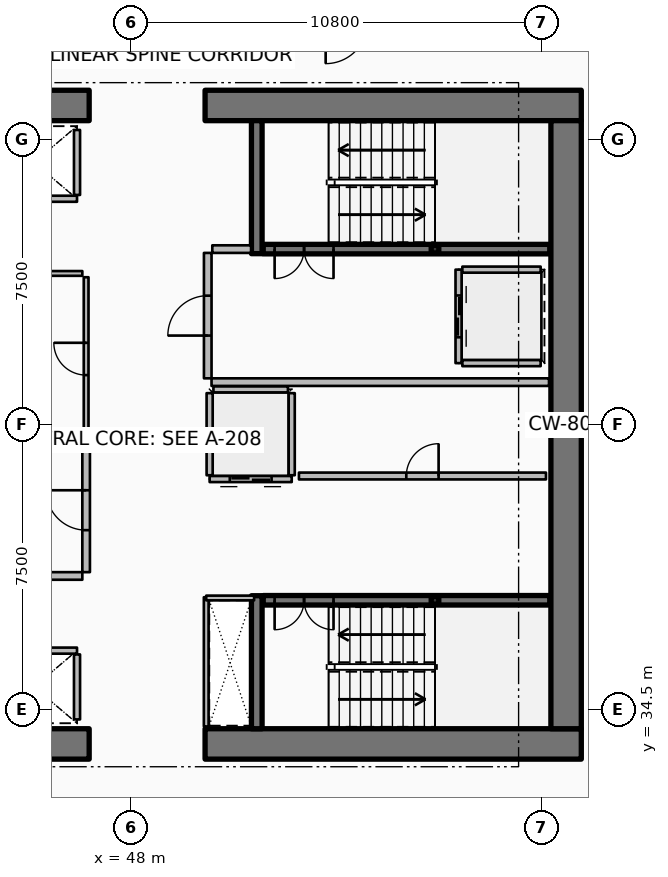
"""IFC4 building model, lengths in metres.
Left out: names, types, materials, properties, quantities, classifications, styles, units other than length and angle.
Written with IfcOpenShell. Run it as: python <this file> out.ifc"""

import sys

from ifc_helpers import new_model, si_unit, direction, frame, frame_2d, origin, origin_2d, place, context, subcontext, project, spatial, rectangle, hollow_rectangle, extrude, element, fill, save


model = new_model("IFC4")
c1 = context("Model", 3, precision=1e-05, world=origin(), true_north=direction((0.0, 1.0)))
c2 = subcontext(c1, "Body", "Model", "MODEL_VIEW")
j1 = project(units=[si_unit("LENGTHUNIT", "METRE"), si_unit("PLANEANGLEUNIT", "RADIAN")], contexts=[c1])
p1 = place(None, origin())
s1 = spatial("IfcSite", under=j1, at=p1, CompositionType="ELEMENT")
p2 = place(p1, origin())
s2 = spatial("IfcBuilding", under=s1, at=p2, CompositionType="ELEMENT")
p3 = place(p2, frame((0.0, 0.0, 172.8)))
s3 = spatial("IfcBuildingStorey", under=s2, at=p3, CompositionType="ELEMENT", Elevation=172.8)
p4 = place(p3, frame((37.0, 33.6, 0.0), z_axis=(0.0, 0.0, 1.0), x_axis=(1.0, 0.0, 0.0)))
e1 = element("IfcWall", 1, at=p4, inside=s3, PredefinedType="SHEAR", context=c2, shape_type="SweptSolid", body=[
    extrude(rectangle(XDim=9.9, YDim=0.8, at=frame_2d((4.95, 0.0))), origin(), (0.0, 0.0, 1.0), 3.75),
])
p5 = place(p3, frame((49.95, 33.6, 0.0), z_axis=(0.0, 0.0, 1.0), x_axis=(1.0, 0.0, 0.0)))
e2 = element("IfcWall", 2, at=p5, inside=s3, PredefinedType="SHEAR", context=c2, shape_type="SweptSolid", body=[
    extrude(rectangle(XDim=9.9, YDim=0.8, at=frame_2d((4.95, 0.0))), origin(), (0.0, 0.0, 1.0), 3.75),
])
p6 = place(p3, frame((37.0, 50.4, 0.0), z_axis=(0.0, 0.0, 1.0), x_axis=(1.0, 0.0, 0.0)))
e3 = element("IfcWall", 3, at=p6, inside=s3, PredefinedType="SHEAR", context=c2, shape_type="SweptSolid", body=[
    extrude(rectangle(XDim=9.9, YDim=0.8, at=frame_2d((4.95, 0.0))), origin(), (0.0, 0.0, 1.0), 3.75),
])
p7 = place(p3, frame((49.95, 50.4, 0.0), z_axis=(0.0, 0.0, 1.0), x_axis=(1.0, 0.0, 0.0)))
e4 = element("IfcWall", 4, at=p7, inside=s3, PredefinedType="SHEAR", context=c2, shape_type="SweptSolid", body=[
    extrude(rectangle(XDim=9.9, YDim=0.8, at=frame_2d((4.95, 0.0))), origin(), (0.0, 0.0, 1.0), 3.75),
])
p8 = place(p3, frame((59.45, 34.0, 0.0), z_axis=(0.0, 0.0, 1.0), x_axis=(0.0, 1.0, 0.0)))
e5 = element("IfcWall", 5, at=p8, inside=s3, PredefinedType="SHEAR", context=c2, shape_type="SweptSolid", body=[
    extrude(rectangle(XDim=16.0, YDim=0.8, at=frame_2d((8.0, 0.0))), origin(), (0.0, 0.0, 1.0), 3.75),
])
for number, where, z_axis, x_axis in (
    (6, (51.31, 46.5, 0.0), (0.0, 0.0, 1.0), (0.0, 1.0, 0.0)),
    (7, (51.31, 34.0, 0.0), (0.0, 0.0, 1.0), (0.0, 1.0, 0.0)),
):
    element("IfcWall", number, at=place(p3, frame(where, z_axis=z_axis, x_axis=x_axis)), inside=s3, PredefinedType="SHEAR", context=c2, shape_type="SweptSolid", body=[
        extrude(rectangle(XDim=3.5, YDim=0.28, at=frame_2d((1.75, 0.0))), origin(), (0.0, 0.0, 1.0), 3.75),
    ])
for number, where, z_axis, x_axis in (
    (8, (56.0, 46.62, 0.0), (0.0, 0.0, 1.0), (1.0, 0.0, 0.0)),
    (9, (56.0, 37.38, 0.0), (0.0, 0.0, 1.0), (1.0, 0.0, 0.0)),
):
    element("IfcColumn", number, at=place(p3, frame(where, z_axis=z_axis, x_axis=x_axis)), inside=s3, PredefinedType="COLUMN", context=c2, shape_type="SweptSolid", body=[
        extrude(hollow_rectangle(XDim=0.2, YDim=0.2, WallThickness=0.01, InnerFilletRadius=0.01, OuterFilletRadius=0.02, at=origin_2d()), origin(), (0.0, 0.0, 1.0), 1.67),
    ])
p9 = place(p3, frame((51.48, 46.62, 0.0), z_axis=(0.0, 0.0, 1.0), x_axis=(1.0, 0.0, 0.0)))
e10 = element("IfcWall", 10, at=p9, inside=s3, PredefinedType="SOLIDWALL", context=c2, shape_type="SweptSolid", body=[
    extrude(rectangle(XDim=7.54, YDim=0.25, at=frame_2d((3.77, 0.0))), origin(), (0.0, 0.0, 1.0), 3.35),
])
p10 = place(p9, frame((0.3, 0.0, 0.0)))
e11 = element("IfcOpeningElement", 11, at=p10, cuts=e10, PredefinedType="OPENING", context=c2, shape_type="SweptSolid", body=[
    extrude(rectangle(XDim=1.55, YDim=2.15, at=frame_2d((0.775, 1.075))), frame((0.0, 0.135, 0.0), z_axis=(0.0, -1.0, 0.0), x_axis=(1.0, 0.0, 0.0)), (0.0, 0.0, 1.0), 0.27),
])
p11 = place(p3, frame((51.48, 37.38, 0.0), z_axis=(0.0, 0.0, 1.0), x_axis=(1.0, 0.0, 0.0)))
e12 = element("IfcWall", 12, at=p11, inside=s3, PredefinedType="SOLIDWALL", context=c2, shape_type="SweptSolid", body=[
    extrude(rectangle(XDim=7.54, YDim=0.25, at=frame_2d((3.77, 0.0))), origin(), (0.0, 0.0, 1.0), 3.35),
])
p12 = place(p11, frame((0.3, 0.0, 0.0)))
e13 = element("IfcOpeningElement", 13, at=p12, cuts=e12, PredefinedType="OPENING", context=c2, shape_type="SweptSolid", body=[
    extrude(rectangle(XDim=1.55, YDim=2.15, at=frame_2d((0.775, 1.075))), frame((0.0, 0.135, 0.0), z_axis=(0.0, -1.0, 0.0), x_axis=(1.0, 0.0, 0.0)), (0.0, 0.0, 1.0), 0.27),
])
p13 = place(p3, frame((46.58, 47.945, 0.0), z_axis=(0.0, 0.0, 1.0), x_axis=(-1.0, 0.0, 0.0)))
e14 = element("IfcWall", 14, at=p13, inside=s3, PredefinedType="PARTITIONING", context=c2, shape_type="SweptSolid", body=[
    extrude(rectangle(XDim=2.26, YDim=0.16, at=frame_2d((1.13, 0.0))), origin(), (0.0, 0.0, 1.0), 3.35),
])
p14 = place(p3, frame((46.58, 48.045, 0.0), z_axis=(0.0, 0.0, 1.0), x_axis=(0.0, 1.0, 0.0)))
e15 = element("IfcWall", 15, at=p14, inside=s3, PredefinedType="PARTITIONING", context=c2, shape_type="SweptSolid", body=[
    extrude(rectangle(XDim=1.71, YDim=0.16, at=frame_2d((0.855, 0.0))), origin(), (0.0, 0.0, 1.0), 3.35),
])
p15 = place(p3, frame((44.32, 36.055, 0.0), z_axis=(0.0, 0.0, 1.0), x_axis=(1.0, 0.0, 0.0)))
e16 = element("IfcWall", 16, at=p15, inside=s3, PredefinedType="PARTITIONING", context=c2, shape_type="SweptSolid", body=[
    extrude(rectangle(XDim=2.26, YDim=0.16, at=frame_2d((1.13, 0.0))), origin(), (0.0, 0.0, 1.0), 3.35),
])
p16 = place(p3, frame((46.58, 34.245, 0.0), z_axis=(0.0, 0.0, 1.0), x_axis=(0.0, 1.0, 0.0)))
e17 = element("IfcWall", 17, at=p16, inside=s3, PredefinedType="PARTITIONING", context=c2, shape_type="SweptSolid", body=[
    extrude(rectangle(XDim=1.71, YDim=0.16, at=frame_2d((0.855, 0.0))), origin(), (0.0, 0.0, 1.0), 3.35),
])
p17 = place(p3, frame((56.62, 46.08, 0.0), z_axis=(0.0, 0.0, 1.0), x_axis=(0.0, -1.0, 0.0)))
e18 = element("IfcWall", 18, at=p17, inside=s3, PredefinedType="PARTITIONING", context=c2, shape_type="SweptSolid", body=[
    extrude(rectangle(XDim=2.46, YDim=0.16, at=frame_2d((1.23, 0.0))), origin(), (0.0, 0.0, 1.0), 3.35),
])
p18 = place(p17, frame((0.68, 0.0, 0.0)))
e19 = element("IfcOpeningElement", 19, at=p18, cuts=e18, PredefinedType="OPENING", context=c2, shape_type="SweptSolid", body=[
    extrude(rectangle(XDim=1.1, YDim=2.1, at=frame_2d((0.55, 1.05))), frame((0.0, 0.09, 0.0), z_axis=(0.0, -1.0, 0.0), x_axis=(1.0, 0.0, 0.0)), (0.0, 0.0, 1.0), 0.18),
])
for number, where, z_axis, x_axis in (
    (20, (56.72, 46.08, 0.0), (0.0, 0.0, 1.0), (1.0, 0.0, 0.0)),
    (21, (56.72, 43.62, 0.0), (0.0, 0.0, 1.0), (1.0, 0.0, 0.0)),
):
    element("IfcWall", number, at=place(p3, frame(where, z_axis=z_axis, x_axis=x_axis)), inside=s3, PredefinedType="PARTITIONING", context=c2, shape_type="SweptSolid", body=[
        extrude(rectangle(XDim=2.06, YDim=0.16, at=frame_2d((1.03, 0.0))), origin(), (0.0, 0.0, 1.0), 3.35),
    ])
p19 = place(p3, frame((52.23, 40.57, 0.0), z_axis=(0.0, 0.0, 1.0), x_axis=(-1.0, 0.0, 0.0)))
e22 = element("IfcWall", 22, at=p19, inside=s3, PredefinedType="PARTITIONING", context=c2, shape_type="SweptSolid", body=[
    extrude(rectangle(XDim=2.16, YDim=0.16, at=frame_2d((1.08, 0.0))), origin(), (0.0, 0.0, 1.0), 3.35),
])
p20 = place(p19, frame((0.53, 0.0, 0.0)))
e23 = element("IfcOpeningElement", 23, at=p20, cuts=e22, PredefinedType="OPENING", context=c2, shape_type="SweptSolid", body=[
    extrude(rectangle(XDim=1.1, YDim=2.1, at=frame_2d((0.55, 1.05))), frame((0.0, 0.09, 0.0), z_axis=(0.0, -1.0, 0.0), x_axis=(1.0, 0.0, 0.0)), (0.0, 0.0, 1.0), 0.18),
])
for number, where, z_axis, x_axis in (
    (24, (52.23, 40.67, 0.0), (0.0, 0.0, 1.0), (0.0, 1.0, 0.0)),
    (25, (50.07, 40.67, 0.0), (0.0, 0.0, 1.0), (0.0, 1.0, 0.0)),
):
    element("IfcWall", number, at=place(p3, frame(where, z_axis=z_axis, x_axis=x_axis)), inside=s3, PredefinedType="PARTITIONING", context=c2, shape_type="SweptSolid", body=[
        extrude(rectangle(XDim=2.16, YDim=0.16, at=frame_2d((1.08, 0.0))), origin(), (0.0, 0.0, 1.0), 3.35),
    ])
p21 = place(p3, frame((50.17, 42.93, 0.0), z_axis=(0.0, 0.0, 1.0), x_axis=(1.0, 0.0, 0.0)))
e26 = element("IfcWall", 26, at=p21, inside=s3, PredefinedType="PARTITIONING", context=c2, shape_type="SweptSolid", body=[
    extrude(rectangle(XDim=1.96, YDim=0.16, at=frame_2d((0.98, 0.0))), origin(), (0.0, 0.0, 1.0), 3.35),
])
p22 = place(p3, frame((52.42, 40.65, 0.0), z_axis=(0.0, 0.0, 1.0), x_axis=(1.0, 0.0, 0.0)))
e27 = element("IfcWall", 27, at=p22, inside=s3, PredefinedType="PARTITIONING", context=c2, shape_type="SweptSolid", body=[
    extrude(rectangle(XDim=6.5, YDim=0.18, at=frame_2d((3.25, 0.0))), origin(), (0.0, 0.0, 1.0), 3.35),
])
p23 = place(p22, frame((2.825, 0.0, 0.0)))
e28 = element("IfcOpeningElement", 28, at=p23, cuts=e27, PredefinedType="OPENING", context=c2, shape_type="SweptSolid", body=[
    extrude(rectangle(XDim=0.85, YDim=2.06, at=frame_2d((0.425, 1.03))), frame((0.0, 0.1, 0.0), z_axis=(0.0, -1.0, 0.0), x_axis=(1.0, 0.0, 0.0)), (0.0, 0.0, 1.0), 0.2),
])
p24 = place(p3, frame((41.35, 38.02, 0.0), z_axis=(0.0, 0.0, 1.0), x_axis=(1.0, 0.0, 0.0)))
e29 = element("IfcWall", 29, at=p24, inside=s3, PredefinedType="PARTITIONING", context=c2, shape_type="SweptSolid", body=[
    extrude(rectangle(XDim=5.37, YDim=0.2, at=frame_2d((2.685, 0.0))), origin(), (0.0, 0.0, 1.0), 3.35),
])
p25 = place(p3, frame((43.92, 41.48, 0.0), z_axis=(0.0, 0.0, 1.0), x_axis=(1.0, 0.0, 0.0)))
e30 = element("IfcWall", 30, at=p25, inside=s3, PredefinedType="PARTITIONING", context=c2, shape_type="SweptSolid", body=[
    extrude(rectangle(XDim=2.8, YDim=0.2, at=frame_2d((1.4, 0.0))), origin(), (0.0, 0.0, 1.0), 3.35),
])
p26 = place(p3, frame((46.82, 38.12, 0.0), z_axis=(0.0, 0.0, 1.0), x_axis=(0.0, 1.0, 0.0)))
e31 = element("IfcWall", 31, at=p26, inside=s3, PredefinedType="PARTITIONING", context=c2, shape_type="SweptSolid", body=[
    extrude(rectangle(XDim=3.26, YDim=0.2, at=frame_2d((1.63, 0.0))), origin(), (0.0, 0.0, 1.0), 3.35),
])
p27 = place(p26, frame((1.105, 0.0, 0.0)))
e32 = element("IfcOpeningElement", 32, at=p27, cuts=e31, PredefinedType="OPENING", context=c2, shape_type="SweptSolid", body=[
    extrude(rectangle(XDim=1.05, YDim=2.1, at=frame_2d((0.525, 1.05))), frame((0.0, 0.11, 0.0), z_axis=(0.0, -1.0, 0.0), x_axis=(1.0, 0.0, 0.0)), (0.0, 0.0, 1.0), 0.22),
])
p28 = place(p3, frame((50.12, 43.12, 0.0), z_axis=(0.0, 0.0, 1.0), x_axis=(1.0, 0.0, 0.0)))
e33 = element("IfcWall", 33, at=p28, inside=s3, PredefinedType="PARTITIONING", context=c2, shape_type="SweptSolid", body=[
    extrude(rectangle(XDim=8.88, YDim=0.2, at=frame_2d((4.44, 0.0))), origin(), (0.0, 0.0, 1.0), 3.35),
])
p29 = place(p3, frame((50.14, 46.62, 0.0), z_axis=(0.0, 0.0, 1.0), x_axis=(1.0, 0.0, 0.0)))
e34 = element("IfcWall", 34, at=p29, inside=s3, PredefinedType="PARTITIONING", context=c2, shape_type="SweptSolid", body=[
    extrude(rectangle(XDim=1.02, YDim=0.2, at=frame_2d((0.51, 0.0))), origin(), (0.0, 0.0, 1.0), 3.35),
])
p30 = place(p3, frame((50.02, 43.22, 0.0), z_axis=(0.0, 0.0, 1.0), x_axis=(0.0, 1.0, 0.0)))
e35 = element("IfcWall", 35, at=p30, inside=s3, PredefinedType="PARTITIONING", context=c2, shape_type="SweptSolid", body=[
    extrude(rectangle(XDim=3.3, YDim=0.2, at=frame_2d((1.65, 0.0))), origin(), (0.0, 0.0, 1.0), 3.35),
])
p31 = place(p30, frame((1.125, 0.0, 0.0)))
e36 = element("IfcOpeningElement", 36, at=p31, cuts=e35, PredefinedType="OPENING", context=c2, shape_type="SweptSolid", body=[
    extrude(rectangle(XDim=1.05, YDim=2.1, at=frame_2d((0.525, 1.05))), frame((0.0, 0.11, 0.0), z_axis=(0.0, -1.0, 0.0), x_axis=(1.0, 0.0, 0.0)), (0.0, 0.0, 1.0), 0.22),
])
p32 = place(p3, frame((41.36, 45.98, 0.0), z_axis=(0.0, 0.0, 1.0), x_axis=(1.0, 0.0, 0.0)))
e37 = element("IfcWall", 37, at=p32, inside=s3, PredefinedType="PARTITIONING", context=c2, shape_type="SweptSolid", body=[
    extrude(rectangle(XDim=5.36, YDim=0.125, at=frame_2d((2.68, 0.0))), origin(), (0.0, 0.0, 1.0), 2.79),
])
p33 = place(p3, frame((49.98, 34.06, 0.0), z_axis=(0.0, 0.0, 1.0), x_axis=(0.0, 1.0, 0.0)))
e38 = element("IfcWall", 38, at=p33, inside=s3, PredefinedType="PARTITIONING", context=c2, shape_type="SweptSolid", body=[
    extrude(rectangle(XDim=3.4, YDim=0.125, at=frame_2d((1.7, 0.0))), origin(), (0.0, 0.0, 1.0), 2.79),
])
p34 = place(p3, frame((49.98, 37.44, 0.0), z_axis=(0.0, 0.0, 1.0), x_axis=(1.0, 0.0, 0.0)))
e39 = element("IfcWall", 39, at=p34, inside=s3, PredefinedType="PARTITIONING", context=c2, shape_type="SweptSolid", body=[
    extrude(rectangle(XDim=1.26, YDim=0.125, at=frame_2d((0.63, 0.0))), origin(), (0.0, 0.0, 1.0), 2.79),
])
p35 = place(p3, frame((46.82, 41.58, 0.0), z_axis=(0.0, 0.0, 1.0), x_axis=(0.0, 1.0, 0.0)))
e40 = element("IfcWall", 40, at=p35, inside=s3, PredefinedType="PARTITIONING", context=c2, shape_type="SweptSolid", body=[
    extrude(rectangle(XDim=4.3, YDim=0.125, at=frame_2d((2.15, 0.0))), origin(), (0.0, 0.0, 1.0), 2.79),
])
p36 = place(p35, frame((1.725, 0.0, 0.0)))
e41 = element("IfcOpeningElement", 41, at=p36, cuts=e40, PredefinedType="OPENING", context=c2, shape_type="SweptSolid", body=[
    extrude(rectangle(XDim=0.85, YDim=2.06, at=frame_2d((0.425, 1.03))), frame((0.0, 0.073, 0.0), z_axis=(0.0, -1.0, 0.0), x_axis=(1.0, 0.0, 0.0)), (0.0, 0.0, 1.0), 0.145),
])
p37 = place(p3, frame((63.52, 50.815, 0.0), z_axis=(0.0, 0.0, 1.0), x_axis=(-0.649447526186, 0.760406411553, 0.0)))
e42 = element("IfcWall", 42, at=p37, inside=s3, PredefinedType="PARTITIONING", context=c2, shape_type="SweptSolid", body=[
    extrude(rectangle(XDim=6.753, YDim=0.125, at=frame_2d((3.376, 0.0))), origin(), (0.0, 0.0, 1.0), 2.307),
])
p38 = place(p37, frame((2.926, 0.0, 0.0)))
e43 = element("IfcOpeningElement", 43, at=p38, cuts=e42, PredefinedType="OPENING", context=c2, shape_type="SweptSolid", body=[
    extrude(rectangle(XDim=0.9, YDim=2.08, at=frame_2d((0.45, 1.04))), frame((0.0, 0.073, 0.0), z_axis=(0.0, -1.0, 0.0), x_axis=(1.0, 0.0, 0.0)), (0.0, 0.0, 1.0), 0.145),
])
p39 = place(p10, origin())
e44 = element("IfcDoor", 44, at=p39, inside=s3, OperationType="DOUBLE_DOOR_SINGLE_SWING", PredefinedType="DOOR", context=c2, shape_type="SweptSolid", body=[
    extrude(rectangle(XDim=1.55, YDim=2.15, at=frame_2d((0.775, 1.075))), frame((0.0, 0.025, 0.0), z_axis=(0.0, -1.0, 0.0), x_axis=(1.0, 0.0, 0.0)), (0.0, 0.0, 1.0), 0.05),
])
fill(e11, e44)
p40 = place(p12, origin())
e45 = element("IfcDoor", 45, at=p40, inside=s3, OperationType="DOUBLE_DOOR_SINGLE_SWING", PredefinedType="DOOR", context=c2, shape_type="SweptSolid", body=[
    extrude(rectangle(XDim=1.55, YDim=2.15, at=frame_2d((0.775, 1.075))), frame((0.0, 0.025, 0.0), z_axis=(0.0, -1.0, 0.0), x_axis=(1.0, 0.0, 0.0)), (0.0, 0.0, 1.0), 0.05),
])
fill(e13, e45)
p41 = place(p18, origin())
e46 = element("IfcDoor", 46, at=p41, inside=s3, OperationType="DOUBLE_DOOR_SLIDING", PredefinedType="DOOR", context=c2, shape_type="SweptSolid", body=[
    extrude(rectangle(XDim=1.1, YDim=2.1, at=frame_2d((0.55, 1.05))), frame((0.0, 0.025, 0.0), z_axis=(0.0, -1.0, 0.0), x_axis=(1.0, 0.0, 0.0)), (0.0, 0.0, 1.0), 0.05),
])
fill(e19, e46)
p42 = place(p20, origin())
e47 = element("IfcDoor", 47, at=p42, inside=s3, OperationType="DOUBLE_DOOR_SLIDING", PredefinedType="DOOR", context=c2, shape_type="SweptSolid", body=[
    extrude(rectangle(XDim=1.1, YDim=2.1, at=frame_2d((0.55, 1.05))), frame((0.0, 0.025, 0.0), z_axis=(0.0, -1.0, 0.0), x_axis=(1.0, 0.0, 0.0)), (0.0, 0.0, 1.0), 0.05),
])
fill(e23, e47)
p43 = place(p23, origin())
e48 = element("IfcDoor", 48, at=p43, inside=s3, OperationType="SINGLE_SWING_RIGHT", PredefinedType="DOOR", context=c2, shape_type="SweptSolid", body=[
    extrude(rectangle(XDim=0.85, YDim=2.06, at=frame_2d((0.425, 1.03))), frame((0.0, 0.025, 0.0), z_axis=(0.0, -1.0, 0.0), x_axis=(1.0, 0.0, 0.0)), (0.0, 0.0, 1.0), 0.05),
])
fill(e28, e48)
p44 = place(p27, origin())
e49 = element("IfcDoor", 49, at=p44, inside=s3, OperationType="SINGLE_SWING_RIGHT", PredefinedType="DOOR", context=c2, shape_type="SweptSolid", body=[
    extrude(rectangle(XDim=1.05, YDim=2.1, at=frame_2d((0.525, 1.05))), frame((0.0, 0.025, 0.0), z_axis=(0.0, -1.0, 0.0), x_axis=(1.0, 0.0, 0.0)), (0.0, 0.0, 1.0), 0.05),
])
fill(e32, e49)
p45 = place(p31, origin())
e50 = element("IfcDoor", 50, at=p45, inside=s3, OperationType="SINGLE_SWING_LEFT", PredefinedType="DOOR", context=c2, shape_type="SweptSolid", body=[
    extrude(rectangle(XDim=1.05, YDim=2.1, at=frame_2d((0.525, 1.05))), frame((0.0, 0.025, 0.0), z_axis=(0.0, -1.0, 0.0), x_axis=(1.0, 0.0, 0.0)), (0.0, 0.0, 1.0), 0.05),
])
fill(e36, e50)
p46 = place(p36, origin())
e51 = element("IfcDoor", 51, at=p46, inside=s3, OperationType="SINGLE_SWING_RIGHT", PredefinedType="DOOR", context=c2, shape_type="SweptSolid", body=[
    extrude(rectangle(XDim=0.85, YDim=2.06, at=frame_2d((0.425, 1.03))), frame((0.0, 0.025, 0.0), z_axis=(0.0, -1.0, 0.0), x_axis=(1.0, 0.0, 0.0)), (0.0, 0.0, 1.0), 0.05),
])
fill(e41, e51)
save(model, sys.argv[1])
